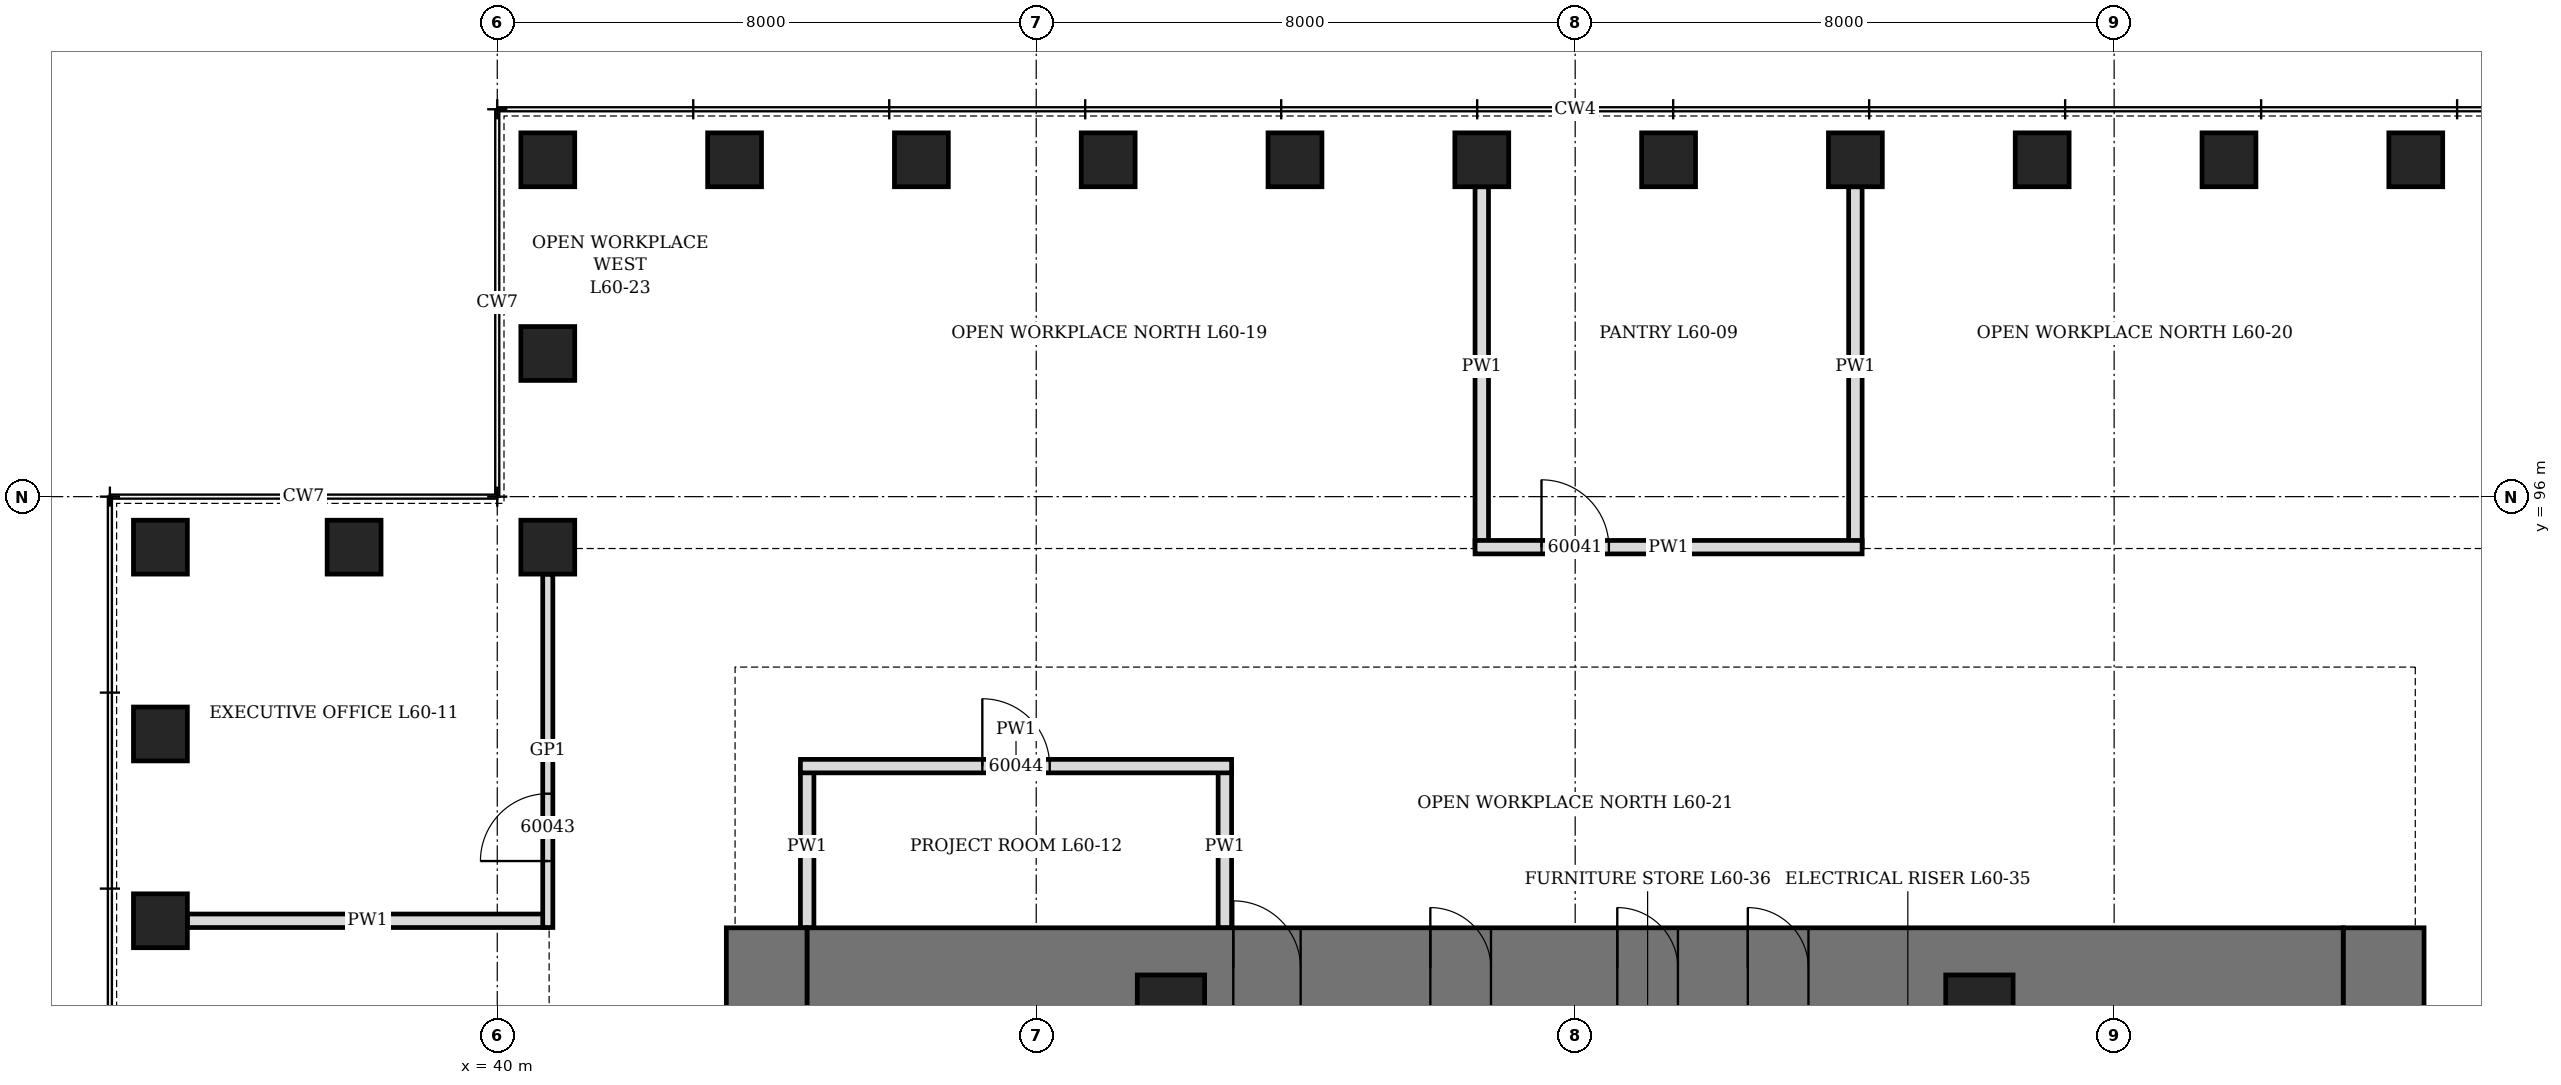
"""IFC4 building model, lengths in metres.
Left out: names, types, materials, properties, quantities, classifications, styles, units other than length and angle.
Written with IfcOpenShell. Run it as: python <this file> out.ifc"""

import sys

from ifc_helpers import new_model, si_unit, direction, frame, frame_2d, origin, origin_2d, place, context, subcontext, project, spatial, rectangle, hollow_rectangle, extrude, element, fill, save


model = new_model("IFC4")
c1 = context("Model", 3, precision=1e-05, world=origin(), true_north=direction((0.0, 1.0)))
c2 = subcontext(c1, "Body", "Model", "MODEL_VIEW")
j1 = project(units=[si_unit("LENGTHUNIT", "METRE"), si_unit("PLANEANGLEUNIT", "RADIAN")], contexts=[c1])
p1 = place(None, origin())
s1 = spatial("IfcSite", under=j1, at=p1, CompositionType="ELEMENT")
p2 = place(p1, origin())
s2 = spatial("IfcBuilding", under=s1, at=p2, CompositionType="ELEMENT")
p3 = place(p2, frame((0.0, 0.0, 267.1)))
s3 = spatial("IfcBuildingStorey", under=s2, at=p3, CompositionType="ELEMENT", Elevation=267.1)
for number, where, z_axis, x_axis in (
    (1, (68.477, 101.0, 0.0), (0.0, 0.0, 1.0), (1.0, 0.0, 0.0)),
    (2, (65.705, 101.0, 0.0), (0.0, 0.0, 1.0), (1.0, 0.0, 0.0)),
    (3, (62.932, 101.0, 0.0), (0.0, 0.0, 1.0), (1.0, 0.0, 0.0)),
    (4, (60.159, 101.0, 0.0), (0.0, 0.0, 1.0), (1.0, 0.0, 0.0)),
    (5, (57.386, 101.0, 0.0), (0.0, 0.0, 1.0), (1.0, 0.0, 0.0)),
    (6, (54.614, 101.0, 0.0), (0.0, 0.0, 1.0), (1.0, 0.0, 0.0)),
    (7, (51.841, 101.0, 0.0), (0.0, 0.0, 1.0), (1.0, 0.0, 0.0)),
    (8, (49.068, 101.0, 0.0), (0.0, 0.0, 1.0), (1.0, 0.0, 0.0)),
    (9, (46.295, 101.0, 0.0), (0.0, 0.0, 1.0), (1.0, 0.0, 0.0)),
    (10, (43.523, 101.0, 0.0), (0.0, 0.0, 1.0), (1.0, 0.0, 0.0)),
    (11, (40.75, 101.0, 0.0), (0.0, 0.0, 1.0), (0.0, 1.0, 0.0)),
    (12, (40.75, 98.125, 0.0), (0.0, 0.0, 1.0), (0.0, 1.0, 0.0)),
    (13, (40.75, 95.25, 0.0), (0.0, 0.0, 1.0), (1.0, 0.0, 0.0)),
    (14, (37.875, 95.25, 0.0), (0.0, 0.0, 1.0), (1.0, 0.0, 0.0)),
    (15, (35.0, 95.25, 0.0), (0.0, 0.0, 1.0), (0.0, 1.0, 0.0)),
    (16, (35.0, 92.477, 0.0), (0.0, 0.0, 1.0), (0.0, 1.0, 0.0)),
    (17, (35.0, 89.705, 0.0), (0.0, 0.0, 1.0), (0.0, 1.0, 0.0)),
):
    element("IfcColumn", number, at=place(p3, frame(where, z_axis=z_axis, x_axis=x_axis)), inside=s3, PredefinedType="COLUMN", context=c2, shape_type="SweptSolid", body=[
        extrude(hollow_rectangle(XDim=0.8, YDim=0.8, WallThickness=0.1, at=origin_2d()), origin(), (0.0, 0.0, 1.0), 4.2),
    ])
p4 = place(p3, frame((44.0, 70.4, 0.0), z_axis=(0.0, 0.0, 1.0), x_axis=(0.0, 1.0, 0.0)))
e18 = element("IfcWall", 18, at=p4, inside=s3, PredefinedType="SHEAR", context=c2, shape_type="SweptSolid", body=[
    extrude(rectangle(XDim=19.2, YDim=1.2, at=frame_2d((9.6, 0.0))), origin(), (0.0, 0.0, 1.0), 4.2),
])
p5 = place(p4, frame((8.6, 0.0, 0.0)))
e19 = element("IfcOpeningElement", 19, at=p5, cuts=e18, PredefinedType="OPENING", context=c2, shape_type="SweptSolid", body=[
    extrude(rectangle(XDim=2.0, YDim=2.4, at=frame_2d((1.0, 1.2))), frame((0.0, 0.61, 0.0), z_axis=(0.0, -1.0, 0.0), x_axis=(1.0, 0.0, 0.0)), (0.0, 0.0, 1.0), 1.22),
])
p6 = place(p3, frame((68.0, 70.4, 0.0), z_axis=(0.0, 0.0, 1.0), x_axis=(0.0, 1.0, 0.0)))
e20 = element("IfcWall", 20, at=p6, inside=s3, PredefinedType="SHEAR", context=c2, shape_type="SweptSolid", body=[
    extrude(rectangle(XDim=19.2, YDim=1.2, at=frame_2d((9.6, 0.0))), origin(), (0.0, 0.0, 1.0), 4.2),
])
p7 = place(p6, frame((8.6, 0.0, 0.0)))
e21 = element("IfcOpeningElement", 21, at=p7, cuts=e20, PredefinedType="OPENING", context=c2, shape_type="SweptSolid", body=[
    extrude(rectangle(XDim=2.0, YDim=2.4, at=frame_2d((1.0, 1.2))), frame((0.0, 0.61, 0.0), z_axis=(0.0, -1.0, 0.0), x_axis=(1.0, 0.0, 0.0)), (0.0, 0.0, 1.0), 1.22),
])
p8 = place(p3, frame((44.6, 89.0, 0.0), z_axis=(0.0, 0.0, 1.0), x_axis=(1.0, 0.0, 0.0)))
e22 = element("IfcWall", 22, at=p8, inside=s3, PredefinedType="SHEAR", context=c2, shape_type="SweptSolid", body=[
    extrude(rectangle(XDim=22.8, YDim=1.2, at=frame_2d((11.4, 0.0))), origin(), (0.0, 0.0, 1.0), 4.2),
])
p9 = place(p8, frame((6.325, 0.0, 0.0)))
e23 = element("IfcOpeningElement", 23, at=p9, cuts=e22, PredefinedType="OPENING", context=c2, shape_type="SweptSolid", body=[
    extrude(rectangle(XDim=1.0, YDim=2.1, at=frame_2d((0.5, 1.05))), frame((0.0, 0.61, 0.0), z_axis=(0.0, -1.0, 0.0), x_axis=(1.0, 0.0, 0.0)), (0.0, 0.0, 1.0), 1.22),
])
p10 = place(p8, frame((9.25, 0.0, 0.0)))
e24 = element("IfcOpeningElement", 24, at=p10, cuts=e22, PredefinedType="OPENING", context=c2, shape_type="SweptSolid", body=[
    extrude(rectangle(XDim=0.9, YDim=2.1, at=frame_2d((0.45, 1.05))), frame((0.0, 0.61, 0.0), z_axis=(0.0, -1.0, 0.0), x_axis=(1.0, 0.0, 0.0)), (0.0, 0.0, 1.0), 1.22),
])
p11 = place(p8, frame((12.025, 0.0, 0.0)))
e25 = element("IfcOpeningElement", 25, at=p11, cuts=e22, PredefinedType="OPENING", context=c2, shape_type="SweptSolid", body=[
    extrude(rectangle(XDim=0.9, YDim=2.1, at=frame_2d((0.45, 1.05))), frame((0.0, 0.61, 0.0), z_axis=(0.0, -1.0, 0.0), x_axis=(1.0, 0.0, 0.0)), (0.0, 0.0, 1.0), 1.22),
])
p12 = place(p8, frame((13.962, 0.0, 0.0)))
e26 = element("IfcOpeningElement", 26, at=p12, cuts=e22, PredefinedType="OPENING", context=c2, shape_type="SweptSolid", body=[
    extrude(rectangle(XDim=0.9, YDim=2.1, at=frame_2d((0.45, 1.05))), frame((0.0, 0.61, 0.0), z_axis=(0.0, -1.0, 0.0), x_axis=(1.0, 0.0, 0.0)), (0.0, 0.0, 1.0), 1.22),
])
for number, where, z_axis, x_axis in (
    (27, (50.0, 88.4, 0.0), (0.0, 0.0, 1.0), (1.0, 0.0, 0.0)),
    (28, (62.0, 88.4, 0.0), (0.0, 0.0, 1.0), (1.0, 0.0, 0.0)),
):
    element("IfcColumn", number, at=place(p3, frame(where, z_axis=z_axis, x_axis=x_axis)), inside=s3, PredefinedType="COLUMN", context=c2, shape_type="SweptSolid", body=[
        extrude(hollow_rectangle(XDim=1.0, YDim=1.0, WallThickness=0.15, at=origin_2d()), origin(), (0.0, 0.0, 1.0), 4.2),
    ])
for number, where, z_axis, x_axis in (
    (29, (54.614, 95.25, 0.0), (0.0, 0.0, 1.0), (0.0, 1.0, 0.0)),
    (30, (60.159, 95.25, 0.0), (0.0, 0.0, 1.0), (0.0, 1.0, 0.0)),
    (31, (35.4, 89.705, 0.0), (0.0, 0.0, 1.0), (1.0, 0.0, 0.0)),
):
    element("IfcWall", number, at=place(p3, frame(where, z_axis=z_axis, x_axis=x_axis)), inside=s3, PredefinedType="PARTITIONING", context=c2, shape_type="SweptSolid", body=[
        extrude(rectangle(XDim=5.35, YDim=0.2, at=frame_2d((2.675, 0.0))), origin(), (0.0, 0.0, 1.0), 3.428),
    ])
for number, where, z_axis, x_axis in (
    (32, (44.6, 89.6, 0.0), (0.0, 0.0, 1.0), (0.0, 1.0, 0.0)),
    (33, (50.8, 89.6, 0.0), (0.0, 0.0, 1.0), (0.0, 1.0, 0.0)),
):
    element("IfcWall", number, at=place(p3, frame(where, z_axis=z_axis, x_axis=x_axis)), inside=s3, PredefinedType="PARTITIONING", context=c2, shape_type="SweptSolid", body=[
        extrude(rectangle(XDim=2.4, YDim=0.2, at=frame_2d((1.2, 0.0))), origin(), (0.0, 0.0, 1.0), 4.04),
    ])
p13 = place(p3, frame((44.5, 92.0, 0.0), z_axis=(0.0, 0.0, 1.0), x_axis=(1.0, 0.0, 0.0)))
e34 = element("IfcWall", 34, at=p13, inside=s3, PredefinedType="PARTITIONING", context=c2, shape_type="SweptSolid", body=[
    extrude(rectangle(XDim=6.4, YDim=0.2, at=frame_2d((3.2, 0.0))), origin(), (0.0, 0.0, 1.0), 4.04),
])
p14 = place(p13, frame((2.7, 0.0, 0.0)))
e35 = element("IfcOpeningElement", 35, at=p14, cuts=e34, PredefinedType="OPENING", context=c2, shape_type="SweptSolid", body=[
    extrude(rectangle(XDim=1.0, YDim=2.1, at=frame_2d((0.5, 1.05))), frame((0.0, 0.11, 0.0), z_axis=(0.0, -1.0, 0.0), x_axis=(1.0, 0.0, 0.0)), (0.0, 0.0, 1.0), 0.22),
])
p15 = place(p3, frame((54.514, 95.25, 0.0), z_axis=(0.0, 0.0, 1.0), x_axis=(1.0, 0.0, 0.0)))
e36 = element("IfcWall", 36, at=p15, inside=s3, PredefinedType="PARTITIONING", context=c2, shape_type="SweptSolid", body=[
    extrude(rectangle(XDim=5.745, YDim=0.2, at=frame_2d((2.873, 0.0))), origin(), (0.0, 0.0, 1.0), 4.04),
])
p16 = place(p15, frame((0.986, 0.0, 0.0)))
e37 = element("IfcOpeningElement", 37, at=p16, cuts=e36, PredefinedType="OPENING", context=c2, shape_type="SweptSolid", body=[
    extrude(rectangle(XDim=1.0, YDim=2.1, at=frame_2d((0.5, 1.05))), frame((0.0, 0.11, 0.0), z_axis=(0.0, -1.0, 0.0), x_axis=(1.0, 0.0, 0.0)), (0.0, 0.0, 1.0), 0.22),
])
p17 = place(p3, frame((40.75, 89.604, 0.0), z_axis=(0.0, 0.0, 1.0), x_axis=(0.0, 1.0, 0.0)))
e38 = element("IfcWall", 38, at=p17, inside=s3, PredefinedType="PARTITIONING", context=c2, shape_type="SweptSolid", body=[
    extrude(rectangle(XDim=5.246, YDim=0.15, at=frame_2d((2.623, 0.0))), origin(), (0.0, 0.0, 1.0), 4.04),
])
p18 = place(p17, frame((0.986, 0.0, 0.0)))
e39 = element("IfcOpeningElement", 39, at=p18, cuts=e38, PredefinedType="OPENING", context=c2, shape_type="SweptSolid", body=[
    extrude(rectangle(XDim=1.0, YDim=2.1, at=frame_2d((0.5, 1.05))), frame((0.0, 0.085, 0.0), z_axis=(0.0, -1.0, 0.0), x_axis=(1.0, 0.0, 0.0)), (0.0, 0.0, 1.0), 0.17),
])
p19 = place(p9, origin())
e40 = element("IfcDoor", 40, at=p19, inside=s3, OperationType="SINGLE_SWING_LEFT", PredefinedType="DOOR", context=c2, shape_type="SweptSolid", body=[
    extrude(rectangle(XDim=1.0, YDim=2.1, at=frame_2d((0.5, 1.05))), frame((0.0, 0.35, 0.0), z_axis=(0.0, -1.0, 0.0), x_axis=(1.0, 0.0, 0.0)), (0.0, 0.0, 1.0), 0.7),
])
fill(e23, e40)
p20 = place(p10, origin())
e41 = element("IfcDoor", 41, at=p20, inside=s3, OperationType="SINGLE_SWING_LEFT", PredefinedType="DOOR", context=c2, shape_type="SweptSolid", body=[
    extrude(rectangle(XDim=0.9, YDim=2.1, at=frame_2d((0.45, 1.05))), frame((0.0, 0.35, 0.0), z_axis=(0.0, -1.0, 0.0), x_axis=(1.0, 0.0, 0.0)), (0.0, 0.0, 1.0), 0.7),
])
fill(e24, e41)
p21 = place(p11, origin())
e42 = element("IfcDoor", 42, at=p21, inside=s3, OperationType="SINGLE_SWING_LEFT", PredefinedType="DOOR", context=c2, shape_type="SweptSolid", body=[
    extrude(rectangle(XDim=0.9, YDim=2.1, at=frame_2d((0.45, 1.05))), frame((0.0, 0.35, 0.0), z_axis=(0.0, -1.0, 0.0), x_axis=(1.0, 0.0, 0.0)), (0.0, 0.0, 1.0), 0.7),
])
fill(e25, e42)
p22 = place(p12, origin())
e43 = element("IfcDoor", 43, at=p22, inside=s3, OperationType="SINGLE_SWING_LEFT", PredefinedType="DOOR", context=c2, shape_type="SweptSolid", body=[
    extrude(rectangle(XDim=0.9, YDim=2.1, at=frame_2d((0.45, 1.05))), frame((0.0, 0.35, 0.0), z_axis=(0.0, -1.0, 0.0), x_axis=(1.0, 0.0, 0.0)), (0.0, 0.0, 1.0), 0.7),
])
fill(e26, e43)
p23 = place(p16, origin())
e44 = element("IfcDoor", 44, at=p23, inside=s3, OperationType="SINGLE_SWING_LEFT", PredefinedType="DOOR", context=c2, shape_type="SweptSolid", body=[
    extrude(rectangle(XDim=1.0, YDim=2.1, at=frame_2d((0.5, 1.05))), frame((0.0, 0.1, 0.0), z_axis=(0.0, -1.0, 0.0), x_axis=(1.0, 0.0, 0.0)), (0.0, 0.0, 1.0), 0.199),
])
fill(e37, e44)
p24 = place(p18, origin())
e45 = element("IfcDoor", 45, at=p24, inside=s3, OperationType="SINGLE_SWING_LEFT", PredefinedType="DOOR", context=c2, shape_type="SweptSolid", body=[
    extrude(rectangle(XDim=1.0, YDim=2.1, at=frame_2d((0.5, 1.05))), frame((0.0, 0.075, 0.0), z_axis=(0.0, -1.0, 0.0), x_axis=(1.0, 0.0, 0.0)), (0.0, 0.0, 1.0), 0.149),
])
fill(e39, e45)
p25 = place(p14, origin())
e46 = element("IfcDoor", 46, at=p25, inside=s3, OperationType="SINGLE_SWING_LEFT", PredefinedType="DOOR", context=c2, shape_type="SweptSolid", body=[
    extrude(rectangle(XDim=1.0, YDim=2.1, at=frame_2d((0.5, 1.05))), frame((0.0, 0.1, 0.0), z_axis=(0.0, -1.0, 0.0), x_axis=(1.0, 0.0, 0.0)), (0.0, 0.0, 1.0), 0.199),
])
fill(e35, e46)
save(model, sys.argv[1])
